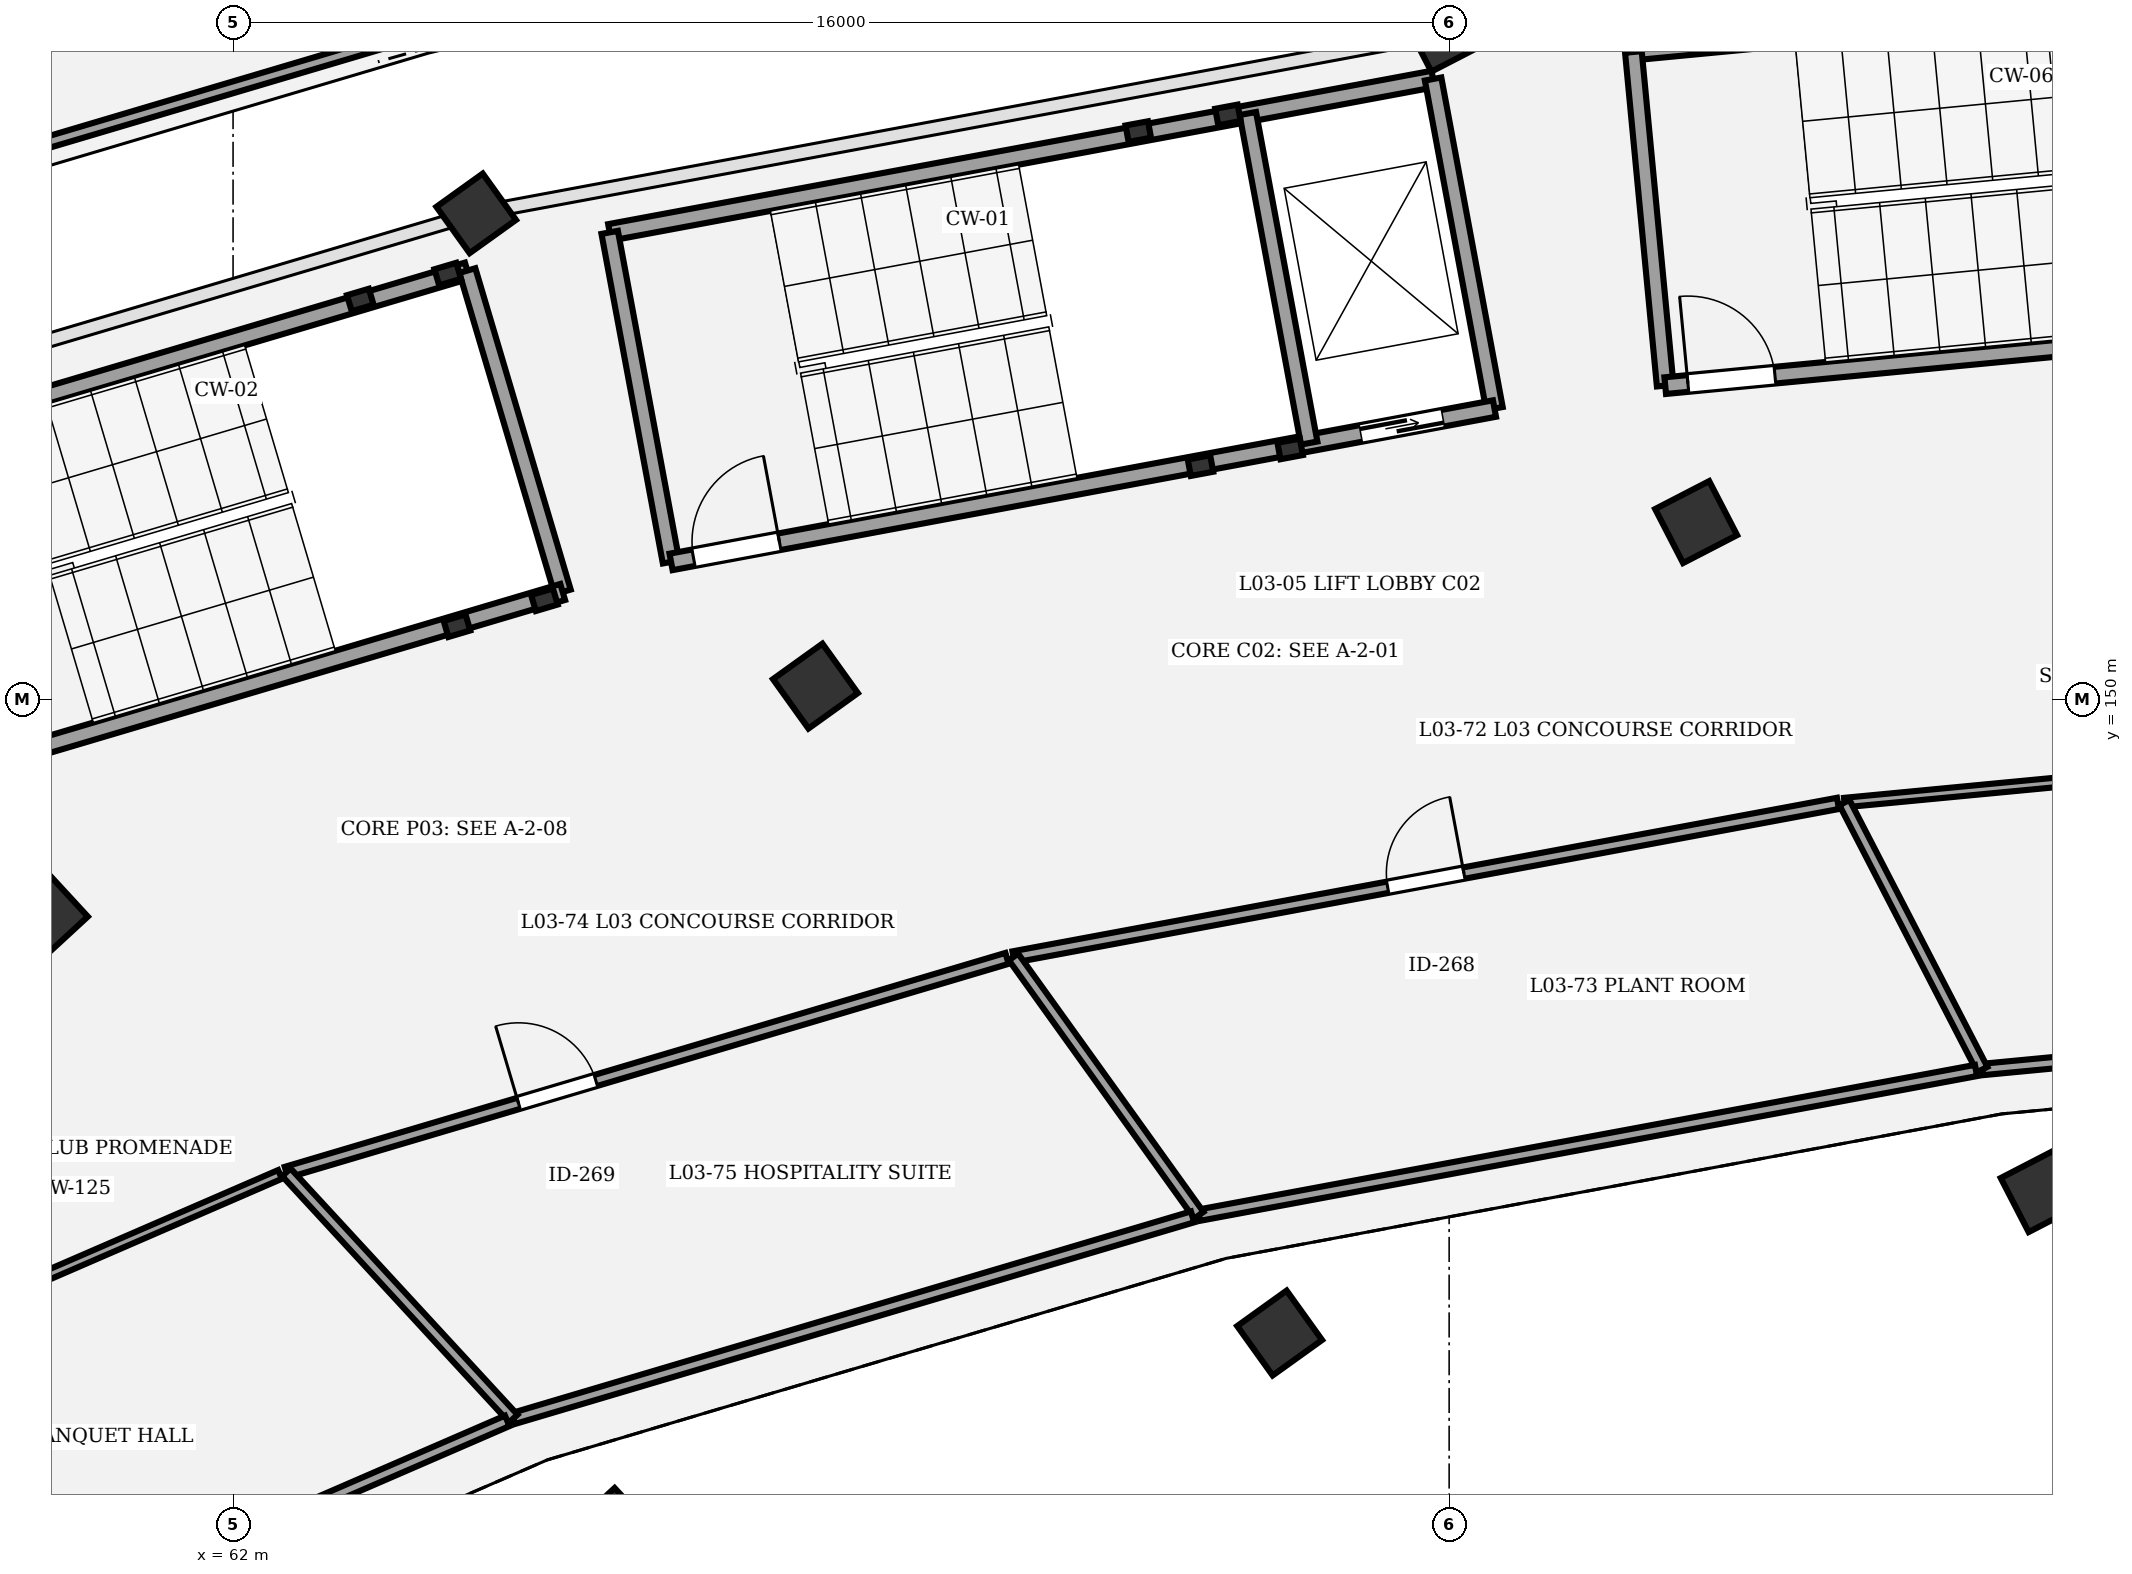
"""IFC4 building model, lengths in metres.
Left out: names, types, materials, properties, quantities, classifications, styles, units other than length and angle.
Written with IfcOpenShell. Run it as: python <this file> out.ifc"""

import sys

from ifc_helpers import new_model, si_unit, direction, frame, frame_2d, origin, origin_2d, place, context, subcontext, project, spatial, rectangle, extrude, element, fill, save


model = new_model("IFC4")
c1 = context("Model", 3, precision=1e-05, world=origin(), true_north=direction((0.0, 1.0)))
c2 = subcontext(c1, "Body", "Model", "MODEL_VIEW")
j1 = project(units=[si_unit("LENGTHUNIT", "METRE"), si_unit("PLANEANGLEUNIT", "RADIAN")], contexts=[c1])
p1 = place(None, origin())
s1 = spatial("IfcSite", under=j1, at=p1, CompositionType="ELEMENT")
p2 = place(p1, origin())
s2 = spatial("IfcBuilding", under=s1, at=p2, CompositionType="ELEMENT")
p3 = place(p2, frame((0.0, 0.0, 14.7)))
s3 = spatial("IfcBuildingStorey", under=s2, at=p3, CompositionType="ELEMENT", Elevation=14.7)
p4 = place(p3, frame((85.796, 143.534, 0.0), z_axis=(0.0, 0.0, 1.0), x_axis=(-0.458959712465, 0.888457079624, 0.0)))
e1 = element("IfcColumn", 1, at=p4, inside=s3, PredefinedType="COLUMN", context=c2, shape_type="SweptSolid", body=[
    extrude(rectangle(XDim=0.8, YDim=0.8, at=origin_2d()), origin(), (0.0, 0.0, 1.0), 2.85),
])
p5 = place(p3, frame((81.25, 152.335, 0.0), z_axis=(0.0, 0.0, 1.0), x_axis=(-0.458959712465, 0.888457079624, 0.0)))
e2 = element("IfcColumn", 2, at=p5, inside=s3, PredefinedType="COLUMN", context=c2, shape_type="SweptSolid", body=[
    extrude(rectangle(XDim=0.8, YDim=0.8, at=origin_2d()), origin(), (0.0, 0.0, 1.0), 4.5),
])
p6 = place(p3, frame((77.927, 158.767, 0.0), z_axis=(0.0, 0.0, 1.0), x_axis=(-0.458959712465, 0.888457079624, 0.0)))
e3 = element("IfcColumn", 3, at=p6, inside=s3, PredefinedType="COLUMN", context=c2, shape_type="SweptSolid", body=[
    extrude(rectangle(XDim=0.75, YDim=0.75, at=origin_2d()), origin(), (0.0, 0.0, 1.0), 4.5),
])
p7 = place(p3, frame((75.77, 141.667, 0.0), z_axis=(0.0, 0.0, 1.0), x_axis=(-0.582974127943, 0.812490717577, 0.0)))
e4 = element("IfcColumn", 4, at=p7, inside=s3, PredefinedType="COLUMN", context=c2, shape_type="SweptSolid", body=[
    extrude(rectangle(XDim=0.8, YDim=0.8, at=origin_2d()), origin(), (0.0, 0.0, 1.0), 2.85),
])
p8 = place(p3, frame((69.662, 150.177, 0.0), z_axis=(0.0, 0.0, 1.0), x_axis=(-0.582974127943, 0.812490717577, 0.0)))
e5 = element("IfcColumn", 5, at=p8, inside=s3, PredefinedType="COLUMN", context=c2, shape_type="SweptSolid", body=[
    extrude(rectangle(XDim=0.8, YDim=0.8, at=origin_2d()), origin(), (0.0, 0.0, 1.0), 4.5),
])
p9 = place(p3, frame((65.199, 156.397, 0.0), z_axis=(0.0, 0.0, 1.0), x_axis=(-0.582974127943, 0.812490717577, 0.0)))
e6 = element("IfcColumn", 6, at=p9, inside=s3, PredefinedType="COLUMN", context=c2, shape_type="SweptSolid", body=[
    extrude(rectangle(XDim=0.75, YDim=0.75, at=origin_2d()), origin(), (0.0, 0.0, 1.0), 4.5),
])
p10 = place(p3, frame((66.997, 139.062, 0.0), z_axis=(0.0, 0.0, 1.0), x_axis=(-0.677903094969, 0.735151272753, 0.0)))
e7 = element("IfcColumn", 7, at=p10, inside=s3, PredefinedType="COLUMN", context=c2, shape_type="SweptSolid", body=[
    extrude(rectangle(XDim=0.8, YDim=0.8, at=origin_2d()), origin(), (0.0, 0.0, 1.0), 2.85),
])
p11 = place(p3, frame((59.524, 147.168, 0.0), z_axis=(0.0, 0.0, 1.0), x_axis=(-0.677903094969, 0.735151272753, 0.0)))
e8 = element("IfcColumn", 8, at=p11, inside=s3, PredefinedType="COLUMN", context=c2, shape_type="SweptSolid", body=[
    extrude(rectangle(XDim=0.8, YDim=0.8, at=origin_2d()), origin(), (0.0, 0.0, 1.0), 4.5),
])
for number, where, z_axis, x_axis in (
    (9, (74.729, 153.078, 0.0), (0.0, 0.0, 1.0), (0.983, 0.183, 0.0)),
    (10, (75.908, 153.298, 0.0), (0.0, 0.0, 1.0), (0.983, 0.183, 0.0)),
    (11, (75.09, 157.692, 0.0), (0.0, 0.0, 1.0), (0.983, 0.183, 0.0)),
    (12, (73.91, 157.473, 0.0), (0.0, 0.0, 1.0), (0.983, 0.183, 0.0)),
):
    element("IfcColumn", number, at=place(p3, frame(where, z_axis=z_axis, x_axis=x_axis)), inside=s3, PredefinedType="COLUMN", context=c2, shape_type="SweptSolid", body=[
        extrude(rectangle(XDim=0.3, YDim=0.22, at=origin_2d()), origin(), (0.0, 0.0, 1.0), 4.5),
    ])
p12 = place(p3, frame((66.955, 156.147, 0.0), z_axis=(0.0, 0.0, 1.0), x_axis=(0.983093434234, 0.183104613723, 0.0)))
e13 = element("IfcWall", 13, at=p12, inside=s3, PredefinedType="SHEAR", context=c2, shape_type="SweptSolid", body=[
    extrude(rectangle(XDim=11.02, YDim=0.22, at=frame_2d((5.51, 0.0))), origin(), (0.0, 0.0, 1.0), 4.25),
])
for number, where, z_axis, x_axis in (
    (14, (67.763, 151.811, 0.0), (0.0, 0.0, 1.0), (-0.183, 0.983, 0.0)),
    (15, (78.596, 153.829, 0.0), (0.0, 0.0, 1.0), (-0.183, 0.983, 0.0)),
):
    element("IfcWall", number, at=place(p3, frame(where, z_axis=z_axis, x_axis=x_axis)), inside=s3, PredefinedType="SHEAR", context=c2, shape_type="SweptSolid", body=[
        extrude(rectangle(XDim=4.41, YDim=0.22, at=frame_2d((2.205, 0.0))), origin(), (0.0, 0.0, 1.0), 4.25),
    ])
p13 = place(p3, frame((67.763, 151.811, 0.0), z_axis=(0.0, 0.0, 1.0), x_axis=(0.983093434234, 0.183104613723, 0.0)))
e16 = element("IfcWall", 16, at=p13, inside=s3, PredefinedType="SHEAR", context=c2, shape_type="SweptSolid", body=[
    extrude(rectangle(XDim=11.02, YDim=0.22, at=frame_2d((5.51, 0.0))), origin(), (0.0, 0.0, 1.0), 4.25),
])
p14 = place(p13, frame((0.3, 0.0, 0.0)))
e17 = element("IfcOpeningElement", 17, at=p14, cuts=e16, PredefinedType="OPENING", context=c2, shape_type="SweptSolid", body=[
    extrude(rectangle(XDim=1.15, YDim=2.15, at=frame_2d((0.575, 1.075))), frame((0.0, 0.12, 0.0), z_axis=(0.0, -1.0, 0.0), x_axis=(1.0, 0.0, 0.0)), (0.0, 0.0, 1.0), 0.24),
])
p15 = place(p13, frame((9.23, 0.0, 0.0)))
e18 = element("IfcOpeningElement", 18, at=p15, cuts=e16, PredefinedType="OPENING", context=c2, shape_type="SweptSolid", body=[
    extrude(rectangle(XDim=1.1, YDim=2.15, at=frame_2d((0.55, 1.075))), frame((0.0, 0.12, 0.0), z_axis=(0.0, -1.0, 0.0), x_axis=(1.0, 0.0, 0.0)), (0.0, 0.0, 1.0), 0.24),
])
p16 = place(p3, frame((76.158, 153.375, 0.0), z_axis=(0.0, 0.0, 1.0), x_axis=(-0.183078394814, 0.983098317236, 0.0)))
e19 = element("IfcWall", 19, at=p16, inside=s3, PredefinedType="SHEAR", context=c2, shape_type="SweptSolid", body=[
    extrude(rectangle(XDim=4.41, YDim=0.22, at=frame_2d((2.205, 0.0))), origin(), (0.0, 0.0, 1.0), 4.25),
])
p17 = place(p3, frame((80.424, 158.521, 0.0), z_axis=(0.0, 0.0, 1.0), x_axis=(0.99547962713, 0.094975322952, 0.0)))
e20 = element("IfcWall", 20, at=p17, inside=s3, PredefinedType="SHEAR", context=c2, shape_type="SweptSolid", body=[
    extrude(rectangle(XDim=11.02, YDim=0.22, at=frame_2d((5.51, 0.0))), origin(), (0.0, 0.0, 1.0), 4.25),
])
p18 = place(p3, frame((80.843, 154.13, 0.0), z_axis=(0.0, 0.0, 1.0), x_axis=(-0.094997189401, 0.995477540684, 0.0)))
e21 = element("IfcWall", 21, at=p18, inside=s3, PredefinedType="SHEAR", context=c2, shape_type="SweptSolid", body=[
    extrude(rectangle(XDim=4.41, YDim=0.22, at=frame_2d((2.205, 0.0))), origin(), (0.0, 0.0, 1.0), 4.25),
])
p19 = place(p3, frame((80.843, 154.13, 0.0), z_axis=(0.0, 0.0, 1.0), x_axis=(0.995479427285, 0.094977417594, 0.0)))
e22 = element("IfcWall", 22, at=p19, inside=s3, PredefinedType="SHEAR", context=c2, shape_type="SweptSolid", body=[
    extrude(rectangle(XDim=11.02, YDim=0.22, at=frame_2d((5.51, 0.0))), origin(), (0.0, 0.0, 1.0), 4.25),
])
p20 = place(p19, frame((0.3, 0.0, 0.0)))
e23 = element("IfcOpeningElement", 23, at=p20, cuts=e22, PredefinedType="OPENING", context=c2, shape_type="SweptSolid", body=[
    extrude(rectangle(XDim=1.15, YDim=2.15, at=frame_2d((0.575, 1.075))), frame((0.0, 0.12, 0.0), z_axis=(0.0, -1.0, 0.0), x_axis=(1.0, 0.0, 0.0)), (0.0, 0.0, 1.0), 0.24),
])
p21 = place(p19, frame((9.08, 0.0, 0.0)))
e24 = element("IfcOpeningElement", 24, at=p21, cuts=e22, PredefinedType="OPENING", context=c2, shape_type="SweptSolid", body=[
    extrude(rectangle(XDim=1.4, YDim=2.25, at=frame_2d((0.7, 1.125))), frame((0.0, 0.12, 0.0), z_axis=(0.0, -1.0, 0.0), x_axis=(1.0, 0.0, 0.0)), (0.0, 0.0, 1.0), 0.24),
])
for number, where, z_axis, x_axis in (
    (25, (64.946, 150.972, 0.0), (0.0, 0.0, 1.0), (0.959, 0.285, 0.0)),
    (26, (66.096, 151.313, 0.0), (0.0, 0.0, 1.0), (0.959, 0.285, 0.0)),
    (27, (64.824, 155.599, 0.0), (0.0, 0.0, 1.0), (0.959, 0.285, 0.0)),
    (28, (63.674, 155.257, 0.0), (0.0, 0.0, 1.0), (0.959, 0.285, 0.0)),
):
    element("IfcColumn", number, at=place(p3, frame(where, z_axis=z_axis, x_axis=x_axis)), inside=s3, PredefinedType="COLUMN", context=c2, shape_type="SweptSolid", body=[
        extrude(rectangle(XDim=0.3, YDim=0.22, at=origin_2d()), origin(), (0.0, 0.0, 1.0), 4.5),
    ])
p22 = place(p3, frame((56.895, 153.214, 0.0), z_axis=(0.0, 0.0, 1.0), x_axis=(0.958675743706, 0.284500998997, 0.0)))
e29 = element("IfcWall", 29, at=p22, inside=s3, PredefinedType="SHEAR", context=c2, shape_type="SweptSolid", body=[
    extrude(rectangle(XDim=8.54, YDim=0.22, at=frame_2d((4.27, 0.0))), origin(), (0.0, 0.0, 1.0), 4.25),
])
p23 = place(p3, frame((66.337, 151.416, 0.0), z_axis=(0.0, 0.0, 1.0), x_axis=(-0.284497328872, 0.958676832861, 0.0)))
e30 = element("IfcWall", 30, at=p23, inside=s3, PredefinedType="SHEAR", context=c2, shape_type="SweptSolid", body=[
    extrude(rectangle(XDim=4.41, YDim=0.22, at=frame_2d((2.205, 0.0))), origin(), (0.0, 0.0, 1.0), 4.25),
])
p24 = place(p3, frame((58.15, 148.986, 0.0), z_axis=(0.0, 0.0, 1.0), x_axis=(0.958665631999, 0.284535069937, 0.0)))
e31 = element("IfcWall", 31, at=p24, inside=s3, PredefinedType="SHEAR", context=c2, shape_type="SweptSolid", body=[
    extrude(rectangle(XDim=8.54, YDim=0.22, at=frame_2d((4.27, 0.0))), origin(), (0.0, 0.0, 1.0), 4.25),
])
p25 = place(p24, frame((0.3, 0.0, 0.0)))
e32 = element("IfcOpeningElement", 32, at=p25, cuts=e31, PredefinedType="OPENING", context=c2, shape_type="SweptSolid", body=[
    extrude(rectangle(XDim=1.15, YDim=2.15, at=frame_2d((0.575, 1.075))), frame((0.0, 0.12, 0.0), z_axis=(0.0, -1.0, 0.0), x_axis=(1.0, 0.0, 0.0)), (0.0, 0.0, 1.0), 0.24),
])
p26 = place(p3, frame((83.201, 148.645, 0.0), z_axis=(0.0, 0.0, 1.0), x_axis=(0.995485111947, 0.094917816515, 0.0)))
e33 = element("IfcWall", 33, at=p26, inside=s3, PredefinedType="PARTITIONING", context=c2, shape_type="SweptSolid", body=[
    extrude(rectangle(XDim=12.822, YDim=0.125, at=frame_2d((6.411, 0.0))), origin(), (0.0, 0.0, 1.0), 3.25),
])
p27 = place(p26, frame((4.241, 0.0, 0.0)))
e34 = element("IfcOpeningElement", 34, at=p27, cuts=e33, PredefinedType="OPENING", context=c2, shape_type="SweptSolid", body=[
    extrude(rectangle(XDim=0.98, YDim=2.2, at=frame_2d((0.49, 1.1))), frame((0.0, 0.073, 0.0), z_axis=(0.0, -1.0, 0.0), x_axis=(1.0, 0.0, 0.0)), (0.0, 0.0, 1.0), 0.145),
])
p28 = place(p3, frame((72.268, 146.614, 0.0), z_axis=(0.0, 0.0, 1.0), x_axis=(0.983097372707, 0.183083466695, 0.0)))
e35 = element("IfcWall", 35, at=p28, inside=s3, PredefinedType="PARTITIONING", context=c2, shape_type="SweptSolid", body=[
    extrude(rectangle(XDim=11.035, YDim=0.15, at=frame_2d((5.517, 0.0))), origin(), (0.0, 0.0, 1.0), 3.25),
])
p29 = place(p28, frame((5.007, 0.0, 0.0)))
e36 = element("IfcOpeningElement", 36, at=p29, cuts=e35, PredefinedType="OPENING", context=c2, shape_type="SweptSolid", body=[
    extrude(rectangle(XDim=1.02, YDim=2.2, at=frame_2d((0.51, 1.1))), frame((0.0, 0.085, 0.0), z_axis=(0.0, -1.0, 0.0), x_axis=(1.0, 0.0, 0.0)), (0.0, 0.0, 1.0), 0.17),
])
p30 = place(p3, frame((62.701, 143.781, 0.0), z_axis=(0.0, 0.0, 1.0), x_axis=(0.958655809656, 0.284568161629, 0.0)))
e37 = element("IfcWall", 37, at=p30, inside=s3, PredefinedType="PARTITIONING", context=c2, shape_type="SweptSolid", body=[
    extrude(rectangle(XDim=9.891, YDim=0.15, at=frame_2d((4.946, 0.0))), origin(), (0.0, 0.0, 1.0), 3.25),
])
p31 = place(p30, frame((3.187, 0.0, 0.0)))
e38 = element("IfcOpeningElement", 38, at=p31, cuts=e37, PredefinedType="OPENING", context=c2, shape_type="SweptSolid", body=[
    extrude(rectangle(XDim=1.06, YDim=2.2, at=frame_2d((0.53, 1.1))), frame((0.0, 0.085, 0.0), z_axis=(0.0, -1.0, 0.0), x_axis=(1.0, 0.0, 0.0)), (0.0, 0.0, 1.0), 0.17),
])
p32 = place(p3, frame((54.315, 140.154, 0.0), z_axis=(0.0, 0.0, 1.0), x_axis=(0.917494590455, 0.397748257677, 0.0)))
e39 = element("IfcWall", 39, at=p32, inside=s3, PredefinedType="PARTITIONING", context=c2, shape_type="SweptSolid", body=[
    extrude(rectangle(XDim=9.049, YDim=0.125, at=frame_2d((4.525, 0.0))), origin(), (0.0, 0.0, 1.0), 3.25),
])
p33 = place(p32, frame((1.782, 0.0, 0.0)))
e40 = element("IfcOpeningElement", 40, at=p33, cuts=e39, PredefinedType="OPENING", context=c2, shape_type="SweptSolid", body=[
    extrude(rectangle(XDim=1.1, YDim=2.2, at=frame_2d((0.55, 1.1))), frame((0.0, 0.073, 0.0), z_axis=(0.0, -1.0, 0.0), x_axis=(1.0, 0.0, 0.0)), (0.0, 0.0, 1.0), 0.145),
])
p34 = place(p3, frame((97.047, 146.281, 0.0), z_axis=(0.0, 0.0, 1.0), x_axis=(-0.995483481464, -0.094934915244, 0.0)))
e41 = element("IfcWall", 41, at=p34, inside=s3, PredefinedType="PARTITIONING", context=c2, shape_type="SweptSolid", body=[
    extrude(rectangle(XDim=12.087, YDim=0.15, at=frame_2d((6.043, 0.0))), origin(), (0.0, 0.0, 1.0), 3.25),
])
p35 = place(p3, frame((85.015, 145.133, 0.0), z_axis=(0.0, 0.0, 1.0), x_axis=(-0.458959114062, 0.888457388747, 0.0)))
e42 = element("IfcWall", 42, at=p35, inside=s3, PredefinedType="PARTITIONING", context=c2, shape_type="SweptSolid", body=[
    extrude(rectangle(XDim=3.953, YDim=0.15, at=frame_2d((1.977, 0.0))), origin(), (0.0, 0.0, 1.0), 3.25),
])
p36 = place(p3, frame((84.932, 145.121, 0.0), z_axis=(0.0, 0.0, 1.0), x_axis=(-0.983096264982, -0.183089414709, 0.0)))
e43 = element("IfcWall", 43, at=p36, inside=s3, PredefinedType="PARTITIONING", context=c2, shape_type="SweptSolid", body=[
    extrude(rectangle(XDim=10.401, YDim=0.15, at=frame_2d((5.2, 0.0))), origin(), (0.0, 0.0, 1.0), 3.25),
])
p37 = place(p3, frame((74.707, 143.216, 0.0), z_axis=(0.0, 0.0, 1.0), x_axis=(-0.583036891366, 0.812445680219, 0.0)))
e44 = element("IfcWall", 44, at=p37, inside=s3, PredefinedType="PARTITIONING", context=c2, shape_type="SweptSolid", body=[
    extrude(rectangle(XDim=4.182, YDim=0.15, at=frame_2d((2.091, 0.0))), origin(), (0.0, 0.0, 1.0), 3.25),
])
p38 = place(p3, frame((74.624, 143.195, 0.0), z_axis=(0.0, 0.0, 1.0), x_axis=(-0.958657695612, -0.284561808126, 0.0)))
e45 = element("IfcWall", 45, at=p38, inside=s3, PredefinedType="PARTITIONING", context=c2, shape_type="SweptSolid", body=[
    extrude(rectangle(XDim=9.322, YDim=0.15, at=frame_2d((4.661, 0.0))), origin(), (0.0, 0.0, 1.0), 3.25),
])
p39 = place(p3, frame((65.688, 140.542, 0.0), z_axis=(0.0, 0.0, 1.0), x_axis=(-0.677847280791, 0.735202736614, 0.0)))
e46 = element("IfcWall", 46, at=p39, inside=s3, PredefinedType="PARTITIONING", context=c2, shape_type="SweptSolid", body=[
    extrude(rectangle(XDim=4.406, YDim=0.15, at=frame_2d((2.203, 0.0))), origin(), (0.0, 0.0, 1.0), 3.25),
])
p40 = place(p3, frame((65.607, 140.511, 0.0), z_axis=(0.0, 0.0, 1.0), x_axis=(-0.917503740796, -0.397727149722, 0.0)))
e47 = element("IfcWall", 47, at=p40, inside=s3, PredefinedType="PARTITIONING", context=c2, shape_type="SweptSolid", body=[
    extrude(rectangle(XDim=8.527, YDim=0.15, at=frame_2d((4.264, 0.0))), origin(), (0.0, 0.0, 1.0), 3.25),
])
p41 = place(p3, frame((64.487, 158.793, 0.0), z_axis=(0.0, 0.0, 1.0), x_axis=(-0.95866000112, -0.284554041006, 0.0)))
e48 = element("IfcWall", 48, at=p41, inside=s3, PredefinedType="PARTITIONING", context=c2, shape_type="SweptSolid", body=[
    extrude(rectangle(XDim=8.478, YDim=0.15, at=frame_2d((4.239, 0.0))), origin(), (0.0, 0.0, 1.0), 3.25),
])
p42 = place(p14, origin())
e49 = element("IfcDoor", 49, at=p42, inside=s3, OperationType="SINGLE_SWING_RIGHT", PredefinedType="DOOR", context=c2, shape_type="SweptSolid", body=[
    extrude(rectangle(XDim=1.15, YDim=2.15, at=frame_2d((0.575, 1.075))), frame((0.0, 0.025, 0.0), z_axis=(0.0, -1.0, 0.0), x_axis=(1.0, 0.0, 0.0)), (0.0, 0.0, 1.0), 0.05),
])
fill(e17, e49)
p43 = place(p15, origin())
e50 = element("IfcDoor", 50, at=p43, inside=s3, OperationType="DOUBLE_DOOR_SLIDING", PredefinedType="DOOR", context=c2, shape_type="SweptSolid", body=[
    extrude(rectangle(XDim=1.1, YDim=2.15, at=frame_2d((0.55, 1.075))), frame((0.0, 0.025, 0.0), z_axis=(0.0, -1.0, 0.0), x_axis=(1.0, 0.0, 0.0)), (0.0, 0.0, 1.0), 0.05),
])
fill(e18, e50)
p44 = place(p20, origin())
e51 = element("IfcDoor", 51, at=p44, inside=s3, OperationType="SINGLE_SWING_LEFT", PredefinedType="DOOR", context=c2, shape_type="SweptSolid", body=[
    extrude(rectangle(XDim=1.15, YDim=2.15, at=frame_2d((0.575, 1.075))), frame((0.0, 0.025, 0.0), z_axis=(0.0, -1.0, 0.0), x_axis=(1.0, 0.0, 0.0)), (0.0, 0.0, 1.0), 0.05),
])
fill(e23, e51)
p45 = place(p29, origin())
e52 = element("IfcDoor", 52, at=p45, inside=s3, OperationType="SINGLE_SWING_RIGHT", PredefinedType="DOOR", context=c2, shape_type="SweptSolid", body=[
    extrude(rectangle(XDim=1.02, YDim=2.2, at=frame_2d((0.51, 1.1))), frame((0.0, 0.025, 0.0), z_axis=(0.0, -1.0, 0.0), x_axis=(1.0, 0.0, 0.0)), (0.0, 0.0, 1.0), 0.05),
])
fill(e36, e52)
p46 = place(p31, origin())
e53 = element("IfcDoor", 53, at=p46, inside=s3, OperationType="SINGLE_SWING_LEFT", PredefinedType="DOOR", context=c2, shape_type="SweptSolid", body=[
    extrude(rectangle(XDim=1.06, YDim=2.2, at=frame_2d((0.53, 1.1))), frame((0.0, 0.025, 0.0), z_axis=(0.0, -1.0, 0.0), x_axis=(1.0, 0.0, 0.0)), (0.0, 0.0, 1.0), 0.05),
])
fill(e38, e53)
save(model, sys.argv[1])
